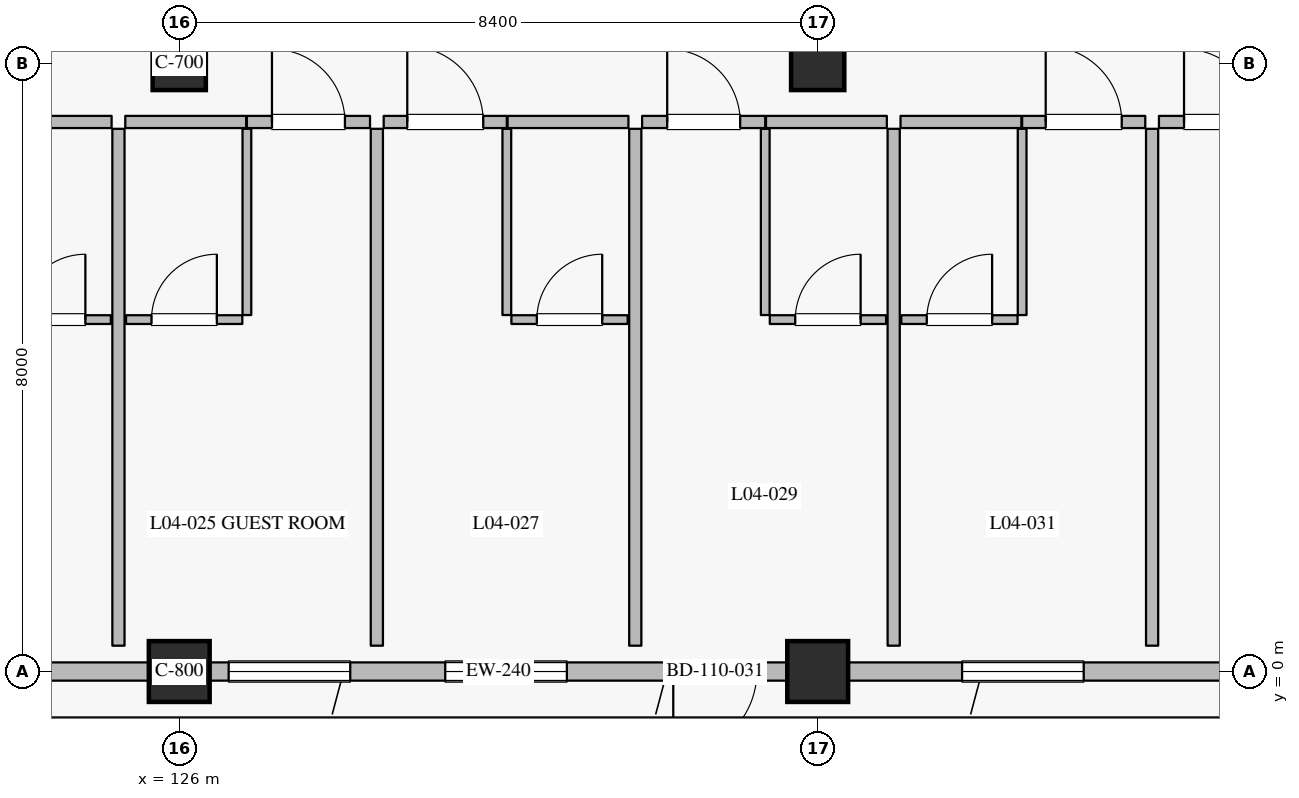
"""IFC4 building model, lengths in metres.
Left out: names, types, materials, properties, quantities, classifications, styles, units other than length and angle.
Written with IfcOpenShell. Run it as: python <this file> out.ifc"""

import sys

from ifc_helpers import new_model, si_unit, direction, frame, frame_2d, origin, origin_2d, place, context, subcontext, project, spatial, rectangle, extrude, element, fill, save


model = new_model("IFC4")
c1 = context("Model", 3, precision=1e-05, world=origin(), true_north=direction((0.0, 1.0)))
c2 = subcontext(c1, "Body", "Model", "MODEL_VIEW")
j1 = project(units=[si_unit("LENGTHUNIT", "METRE"), si_unit("PLANEANGLEUNIT", "RADIAN")], contexts=[c1])
p1 = place(None, origin())
s1 = spatial("IfcSite", under=j1, at=p1, CompositionType="ELEMENT")
p2 = place(p1, origin())
s2 = spatial("IfcBuilding", under=s1, at=p2, CompositionType="ELEMENT")
p3 = place(p2, frame((0.0, 0.0, 21.0)))
s3 = spatial("IfcBuildingStorey", under=s2, at=p3, CompositionType="ELEMENT", Elevation=21.0)
for number, where, z_axis, x_axis in (
    (1, (126.0, 0.0, 0.0), (0.0, 0.0, 1.0), (1.0, 0.0, 0.0)),
    (2, (134.4, 0.0, 0.0), (0.0, 0.0, 1.0), (1.0, 0.0, 0.0)),
):
    element("IfcColumn", number, at=place(p3, frame(where, z_axis=z_axis, x_axis=x_axis)), inside=s3, PredefinedType="COLUMN", context=c2, shape_type="SweptSolid", body=[
        extrude(rectangle(XDim=0.8, YDim=0.8, at=origin_2d()), origin(), (0.0, 0.0, 1.0), 4.2),
    ])
for number, where, z_axis, x_axis in (
    (3, (126.0, 8.0, 0.0), (0.0, 0.0, 1.0), (1.0, 0.0, 0.0)),
    (4, (134.4, 8.0, 0.0), (0.0, 0.0, 1.0), (1.0, 0.0, 0.0)),
):
    element("IfcColumn", number, at=place(p3, frame(where, z_axis=z_axis, x_axis=x_axis)), inside=s3, PredefinedType="COLUMN", context=c2, shape_type="SweptSolid", body=[
        extrude(rectangle(XDim=0.7, YDim=0.7, at=origin_2d()), origin(), (0.0, 0.0, 1.0), 4.2),
    ])
p4 = place(p3, frame((125.6, 0.0, 0.0), z_axis=(0.0, 0.0, 1.0), x_axis=(-1.0, 0.0, 0.0)))
e5 = element("IfcWall", 5, at=p4, inside=s3, PredefinedType="SOLIDWALL", context=c2, shape_type="SweptSolid", body=[
    extrude(rectangle(XDim=7.6, YDim=0.24, at=frame_2d((3.8, 0.0))), origin(), (0.0, 0.0, 1.0), 3.53),
])
p5 = place(p4, frame((1.35, 0.0, 0.0)))
e6 = element("IfcOpeningElement", 6, at=p5, cuts=e5, PredefinedType="OPENING", context=c2, shape_type="SweptSolid", body=[
    extrude(rectangle(XDim=1.5, YDim=2.25, at=frame_2d((0.75, 1.125))), frame((0.0, 0.13, 0.0), z_axis=(0.0, -1.0, 0.0), x_axis=(1.0, 0.0, 0.0)), (0.0, 0.0, 1.0), 0.26),
])
p6 = place(p4, frame((4.7, 0.0, 0.8)))
e7 = element("IfcOpeningElement", 7, at=p6, cuts=e5, PredefinedType="OPENING", context=c2, shape_type="SweptSolid", body=[
    extrude(rectangle(XDim=1.6, YDim=1.6, at=frame_2d((0.8, 0.8))), frame((0.0, 0.13, 0.0), z_axis=(0.0, -1.0, 0.0), x_axis=(1.0, 0.0, 0.0)), (0.0, 0.0, 1.0), 0.26),
])
p7 = place(p3, frame((134.0, 0.0, 0.0), z_axis=(0.0, 0.0, 1.0), x_axis=(-1.0, 0.0, 0.0)))
e8 = element("IfcWall", 8, at=p7, inside=s3, PredefinedType="SOLIDWALL", context=c2, shape_type="SweptSolid", body=[
    extrude(rectangle(XDim=7.6, YDim=0.24, at=frame_2d((3.8, 0.0))), origin(), (0.0, 0.0, 1.0), 3.53),
])
p8 = place(p7, frame((0.4, 0.0, 0.0)))
e9 = element("IfcOpeningElement", 9, at=p8, cuts=e8, PredefinedType="OPENING", context=c2, shape_type="SweptSolid", body=[
    extrude(rectangle(XDim=1.1, YDim=2.2, at=frame_2d((0.55, 1.1))), frame((0.0, 0.13, 0.0), z_axis=(0.0, -1.0, 0.0), x_axis=(1.0, 0.0, 0.0)), (0.0, 0.0, 1.0), 0.26),
])
p9 = place(p7, frame((2.9, 0.0, 0.8)))
e10 = element("IfcOpeningElement", 10, at=p9, cuts=e8, PredefinedType="OPENING", context=c2, shape_type="SweptSolid", body=[
    extrude(rectangle(XDim=1.6, YDim=1.6, at=frame_2d((0.8, 0.8))), frame((0.0, 0.13, 0.0), z_axis=(0.0, -1.0, 0.0), x_axis=(1.0, 0.0, 0.0)), (0.0, 0.0, 1.0), 0.26),
])
p10 = place(p7, frame((5.75, 0.0, 0.8)))
e11 = element("IfcOpeningElement", 11, at=p10, cuts=e8, PredefinedType="OPENING", context=c2, shape_type="SweptSolid", body=[
    extrude(rectangle(XDim=1.6, YDim=1.6, at=frame_2d((0.8, 0.8))), frame((0.0, 0.13, 0.0), z_axis=(0.0, -1.0, 0.0), x_axis=(1.0, 0.0, 0.0)), (0.0, 0.0, 1.0), 0.26),
])
p11 = place(p3, frame((142.4, 0.0, 0.0), z_axis=(0.0, 0.0, 1.0), x_axis=(-1.0, 0.0, 0.0)))
e12 = element("IfcWall", 12, at=p11, inside=s3, PredefinedType="SOLIDWALL", context=c2, shape_type="SweptSolid", body=[
    extrude(rectangle(XDim=7.6, YDim=0.24, at=frame_2d((3.8, 0.0))), origin(), (0.0, 0.0, 1.0), 3.53),
])
p12 = place(p11, frame((1.15, 0.0, 0.0)))
e13 = element("IfcOpeningElement", 13, at=p12, cuts=e12, PredefinedType="OPENING", context=c2, shape_type="SweptSolid", body=[
    extrude(rectangle(XDim=1.5, YDim=2.25, at=frame_2d((0.75, 1.125))), frame((0.0, 0.13, 0.0), z_axis=(0.0, -1.0, 0.0), x_axis=(1.0, 0.0, 0.0)), (0.0, 0.0, 1.0), 0.26),
])
p13 = place(p11, frame((4.5, 0.0, 0.8)))
e14 = element("IfcOpeningElement", 14, at=p13, cuts=e12, PredefinedType="OPENING", context=c2, shape_type="SweptSolid", body=[
    extrude(rectangle(XDim=1.6, YDim=1.6, at=frame_2d((0.8, 0.8))), frame((0.0, 0.13, 0.0), z_axis=(0.0, -1.0, 0.0), x_axis=(1.0, 0.0, 0.0)), (0.0, 0.0, 1.0), 0.26),
])
p14 = place(p3, frame((123.52, 7.23, 0.0), z_axis=(0.0, 0.0, 1.0), x_axis=(1.0, 0.0, 0.0)))
e15 = element("IfcWall", 15, at=p14, inside=s3, PredefinedType="PARTITIONING", context=c2, shape_type="SweptSolid", body=[
    extrude(rectangle(XDim=1.59, YDim=0.16, at=frame_2d((0.795, 0.0))), origin(), (0.0, 0.0, 1.0), 3.965),
])
p15 = place(p3, frame((123.57, 4.63, 0.0), z_axis=(0.0, 0.0, 1.0), x_axis=(1.0, 0.0, 0.0)))
e16 = element("IfcWall", 16, at=p15, inside=s3, PredefinedType="PARTITIONING", context=c2, shape_type="SweptSolid", body=[
    extrude(rectangle(XDim=1.53, YDim=0.115, at=frame_2d((0.765, 0.0))), origin(), (0.0, 0.0, 1.0), 3.965),
])
p16 = place(p15, frame((0.335, 0.0, 0.0)))
e17 = element("IfcOpeningElement", 17, at=p16, cuts=e16, PredefinedType="OPENING", context=c2, shape_type="SweptSolid", body=[
    extrude(rectangle(XDim=0.86, YDim=2.12, at=frame_2d((0.43, 1.06))), frame((0.0, 0.067, 0.0), z_axis=(0.0, -1.0, 0.0), x_axis=(1.0, 0.0, 0.0)), (0.0, 0.0, 1.0), 0.135),
])
p17 = place(p3, frame((125.29, 7.23, 0.0), z_axis=(0.0, 0.0, 1.0), x_axis=(1.0, 0.0, 0.0)))
e18 = element("IfcWall", 18, at=p17, inside=s3, PredefinedType="PARTITIONING", context=c2, shape_type="SweptSolid", body=[
    extrude(rectangle(XDim=1.59, YDim=0.16, at=frame_2d((0.795, 0.0))), origin(), (0.0, 0.0, 1.0), 3.965),
])
p18 = place(p3, frame((126.89, 7.23, 0.0), z_axis=(0.0, 0.0, 1.0), x_axis=(1.0, 0.0, 0.0)))
e19 = element("IfcWall", 19, at=p18, inside=s3, PredefinedType="PARTITIONING", context=c2, shape_type="SweptSolid", body=[
    extrude(rectangle(XDim=1.62, YDim=0.16, at=frame_2d((0.81, 0.0))), origin(), (0.0, 0.0, 1.0), 3.965),
])
p19 = place(p18, frame((0.33, 0.0, 0.0)))
e20 = element("IfcOpeningElement", 20, at=p19, cuts=e19, PredefinedType="OPENING", context=c2, shape_type="SweptSolid", body=[
    extrude(rectangle(XDim=0.96, YDim=2.2, at=frame_2d((0.48, 1.1))), frame((0.0, 0.09, 0.0), z_axis=(0.0, -1.0, 0.0), x_axis=(1.0, 0.0, 0.0)), (0.0, 0.0, 1.0), 0.18),
])
p20 = place(p3, frame((126.89, 4.69, 0.0), z_axis=(0.0, 0.0, 1.0), x_axis=(0.0, 1.0, 0.0)))
e21 = element("IfcWall", 21, at=p20, inside=s3, PredefinedType="PARTITIONING", context=c2, shape_type="SweptSolid", body=[
    extrude(rectangle(XDim=2.45, YDim=0.115, at=frame_2d((1.225, 0.0))), origin(), (0.0, 0.0, 1.0), 3.965),
])
p21 = place(p3, frame((125.3, 4.63, 0.0), z_axis=(0.0, 0.0, 1.0), x_axis=(1.0, 0.0, 0.0)))
e22 = element("IfcWall", 22, at=p21, inside=s3, PredefinedType="PARTITIONING", context=c2, shape_type="SweptSolid", body=[
    extrude(rectangle(XDim=1.53, YDim=0.115, at=frame_2d((0.765, 0.0))), origin(), (0.0, 0.0, 1.0), 3.965),
])
p22 = place(p21, frame((0.335, 0.0, 0.0)))
e23 = element("IfcOpeningElement", 23, at=p22, cuts=e22, PredefinedType="OPENING", context=c2, shape_type="SweptSolid", body=[
    extrude(rectangle(XDim=0.86, YDim=2.12, at=frame_2d((0.43, 1.06))), frame((0.0, 0.067, 0.0), z_axis=(0.0, -1.0, 0.0), x_axis=(1.0, 0.0, 0.0)), (0.0, 0.0, 1.0), 0.135),
])
p23 = place(p3, frame((125.2, 0.34, 0.0), z_axis=(0.0, 0.0, 1.0), x_axis=(0.0, 1.0, 0.0)))
e24 = element("IfcWall", 24, at=p23, inside=s3, PredefinedType="PARTITIONING", context=c2, shape_type="SweptSolid", body=[
    extrude(rectangle(XDim=6.8, YDim=0.16, at=frame_2d((3.4, 0.0))), origin(), (0.0, 0.0, 1.0), 3.965),
])
p24 = place(p3, frame((128.69, 7.23, 0.0), z_axis=(0.0, 0.0, 1.0), x_axis=(1.0, 0.0, 0.0)))
e25 = element("IfcWall", 25, at=p24, inside=s3, PredefinedType="PARTITIONING", context=c2, shape_type="SweptSolid", body=[
    extrude(rectangle(XDim=1.62, YDim=0.16, at=frame_2d((0.81, 0.0))), origin(), (0.0, 0.0, 1.0), 3.965),
])
p25 = place(p24, frame((0.31, 0.0, 0.0)))
e26 = element("IfcOpeningElement", 26, at=p25, cuts=e25, PredefinedType="OPENING", context=c2, shape_type="SweptSolid", body=[
    extrude(rectangle(XDim=1.0, YDim=2.25, at=frame_2d((0.5, 1.125))), frame((0.0, 0.09, 0.0), z_axis=(0.0, -1.0, 0.0), x_axis=(1.0, 0.0, 0.0)), (0.0, 0.0, 1.0), 0.18),
])
p26 = place(p3, frame((130.32, 7.23, 0.0), z_axis=(0.0, 0.0, 1.0), x_axis=(1.0, 0.0, 0.0)))
e27 = element("IfcWall", 27, at=p26, inside=s3, PredefinedType="PARTITIONING", context=c2, shape_type="SweptSolid", body=[
    extrude(rectangle(XDim=1.59, YDim=0.16, at=frame_2d((0.795, 0.0))), origin(), (0.0, 0.0, 1.0), 3.965),
])
p27 = place(p3, frame((130.31, 4.69, 0.0), z_axis=(0.0, 0.0, 1.0), x_axis=(0.0, 1.0, 0.0)))
e28 = element("IfcWall", 28, at=p27, inside=s3, PredefinedType="PARTITIONING", context=c2, shape_type="SweptSolid", body=[
    extrude(rectangle(XDim=2.45, YDim=0.115, at=frame_2d((1.225, 0.0))), origin(), (0.0, 0.0, 1.0), 3.965),
])
p28 = place(p3, frame((130.37, 4.63, 0.0), z_axis=(0.0, 0.0, 1.0), x_axis=(1.0, 0.0, 0.0)))
e29 = element("IfcWall", 29, at=p28, inside=s3, PredefinedType="PARTITIONING", context=c2, shape_type="SweptSolid", body=[
    extrude(rectangle(XDim=1.53, YDim=0.115, at=frame_2d((0.765, 0.0))), origin(), (0.0, 0.0, 1.0), 3.965),
])
p29 = place(p28, frame((0.335, 0.0, 0.0)))
e30 = element("IfcOpeningElement", 30, at=p29, cuts=e29, PredefinedType="OPENING", context=c2, shape_type="SweptSolid", body=[
    extrude(rectangle(XDim=0.86, YDim=2.12, at=frame_2d((0.43, 1.06))), frame((0.0, 0.067, 0.0), z_axis=(0.0, -1.0, 0.0), x_axis=(1.0, 0.0, 0.0)), (0.0, 0.0, 1.0), 0.135),
])
p30 = place(p3, frame((128.6, 0.34, 0.0), z_axis=(0.0, 0.0, 1.0), x_axis=(0.0, 1.0, 0.0)))
e31 = element("IfcWall", 31, at=p30, inside=s3, PredefinedType="PARTITIONING", context=c2, shape_type="SweptSolid", body=[
    extrude(rectangle(XDim=6.8, YDim=0.16, at=frame_2d((3.4, 0.0))), origin(), (0.0, 0.0, 1.0), 3.965),
])
p31 = place(p3, frame((132.09, 7.23, 0.0), z_axis=(0.0, 0.0, 1.0), x_axis=(1.0, 0.0, 0.0)))
e32 = element("IfcWall", 32, at=p31, inside=s3, PredefinedType="PARTITIONING", context=c2, shape_type="SweptSolid", body=[
    extrude(rectangle(XDim=1.62, YDim=0.16, at=frame_2d((0.81, 0.0))), origin(), (0.0, 0.0, 1.0), 3.965),
])
p32 = place(p31, frame((0.33, 0.0, 0.0)))
e33 = element("IfcOpeningElement", 33, at=p32, cuts=e32, PredefinedType="OPENING", context=c2, shape_type="SweptSolid", body=[
    extrude(rectangle(XDim=0.96, YDim=2.2, at=frame_2d((0.48, 1.1))), frame((0.0, 0.09, 0.0), z_axis=(0.0, -1.0, 0.0), x_axis=(1.0, 0.0, 0.0)), (0.0, 0.0, 1.0), 0.18),
])
p33 = place(p3, frame((133.72, 7.23, 0.0), z_axis=(0.0, 0.0, 1.0), x_axis=(1.0, 0.0, 0.0)))
e34 = element("IfcWall", 34, at=p33, inside=s3, PredefinedType="PARTITIONING", context=c2, shape_type="SweptSolid", body=[
    extrude(rectangle(XDim=1.59, YDim=0.16, at=frame_2d((0.795, 0.0))), origin(), (0.0, 0.0, 1.0), 3.965),
])
p34 = place(p3, frame((133.71, 4.69, 0.0), z_axis=(0.0, 0.0, 1.0), x_axis=(0.0, 1.0, 0.0)))
e35 = element("IfcWall", 35, at=p34, inside=s3, PredefinedType="PARTITIONING", context=c2, shape_type="SweptSolid", body=[
    extrude(rectangle(XDim=2.45, YDim=0.115, at=frame_2d((1.225, 0.0))), origin(), (0.0, 0.0, 1.0), 3.965),
])
p35 = place(p3, frame((133.77, 4.63, 0.0), z_axis=(0.0, 0.0, 1.0), x_axis=(1.0, 0.0, 0.0)))
e36 = element("IfcWall", 36, at=p35, inside=s3, PredefinedType="PARTITIONING", context=c2, shape_type="SweptSolid", body=[
    extrude(rectangle(XDim=1.53, YDim=0.115, at=frame_2d((0.765, 0.0))), origin(), (0.0, 0.0, 1.0), 3.965),
])
p36 = place(p35, frame((0.335, 0.0, 0.0)))
e37 = element("IfcOpeningElement", 37, at=p36, cuts=e36, PredefinedType="OPENING", context=c2, shape_type="SweptSolid", body=[
    extrude(rectangle(XDim=0.86, YDim=2.12, at=frame_2d((0.43, 1.06))), frame((0.0, 0.067, 0.0), z_axis=(0.0, -1.0, 0.0), x_axis=(1.0, 0.0, 0.0)), (0.0, 0.0, 1.0), 0.135),
])
p37 = place(p3, frame((132.0, 0.34, 0.0), z_axis=(0.0, 0.0, 1.0), x_axis=(0.0, 1.0, 0.0)))
e38 = element("IfcWall", 38, at=p37, inside=s3, PredefinedType="PARTITIONING", context=c2, shape_type="SweptSolid", body=[
    extrude(rectangle(XDim=6.8, YDim=0.16, at=frame_2d((3.4, 0.0))), origin(), (0.0, 0.0, 1.0), 3.965),
])
p38 = place(p3, frame((135.49, 7.23, 0.0), z_axis=(0.0, 0.0, 1.0), x_axis=(1.0, 0.0, 0.0)))
e39 = element("IfcWall", 39, at=p38, inside=s3, PredefinedType="PARTITIONING", context=c2, shape_type="SweptSolid", body=[
    extrude(rectangle(XDim=1.59, YDim=0.16, at=frame_2d((0.795, 0.0))), origin(), (0.0, 0.0, 1.0), 3.965),
])
p39 = place(p3, frame((137.09, 7.23, 0.0), z_axis=(0.0, 0.0, 1.0), x_axis=(1.0, 0.0, 0.0)))
e40 = element("IfcWall", 40, at=p39, inside=s3, PredefinedType="PARTITIONING", context=c2, shape_type="SweptSolid", body=[
    extrude(rectangle(XDim=1.62, YDim=0.16, at=frame_2d((0.81, 0.0))), origin(), (0.0, 0.0, 1.0), 3.965),
])
p40 = place(p39, frame((0.31, 0.0, 0.0)))
e41 = element("IfcOpeningElement", 41, at=p40, cuts=e40, PredefinedType="OPENING", context=c2, shape_type="SweptSolid", body=[
    extrude(rectangle(XDim=1.0, YDim=2.25, at=frame_2d((0.5, 1.125))), frame((0.0, 0.09, 0.0), z_axis=(0.0, -1.0, 0.0), x_axis=(1.0, 0.0, 0.0)), (0.0, 0.0, 1.0), 0.18),
])
p41 = place(p3, frame((137.09, 4.69, 0.0), z_axis=(0.0, 0.0, 1.0), x_axis=(0.0, 1.0, 0.0)))
e42 = element("IfcWall", 42, at=p41, inside=s3, PredefinedType="PARTITIONING", context=c2, shape_type="SweptSolid", body=[
    extrude(rectangle(XDim=2.45, YDim=0.115, at=frame_2d((1.225, 0.0))), origin(), (0.0, 0.0, 1.0), 3.965),
])
p42 = place(p3, frame((135.5, 4.63, 0.0), z_axis=(0.0, 0.0, 1.0), x_axis=(1.0, 0.0, 0.0)))
e43 = element("IfcWall", 43, at=p42, inside=s3, PredefinedType="PARTITIONING", context=c2, shape_type="SweptSolid", body=[
    extrude(rectangle(XDim=1.53, YDim=0.115, at=frame_2d((0.765, 0.0))), origin(), (0.0, 0.0, 1.0), 3.965),
])
p43 = place(p42, frame((0.335, 0.0, 0.0)))
e44 = element("IfcOpeningElement", 44, at=p43, cuts=e43, PredefinedType="OPENING", context=c2, shape_type="SweptSolid", body=[
    extrude(rectangle(XDim=0.86, YDim=2.12, at=frame_2d((0.43, 1.06))), frame((0.0, 0.067, 0.0), z_axis=(0.0, -1.0, 0.0), x_axis=(1.0, 0.0, 0.0)), (0.0, 0.0, 1.0), 0.135),
])
p44 = place(p3, frame((135.4, 0.34, 0.0), z_axis=(0.0, 0.0, 1.0), x_axis=(0.0, 1.0, 0.0)))
e45 = element("IfcWall", 45, at=p44, inside=s3, PredefinedType="PARTITIONING", context=c2, shape_type="SweptSolid", body=[
    extrude(rectangle(XDim=6.8, YDim=0.16, at=frame_2d((3.4, 0.0))), origin(), (0.0, 0.0, 1.0), 3.965),
])
p45 = place(p3, frame((138.89, 7.23, 0.0), z_axis=(0.0, 0.0, 1.0), x_axis=(1.0, 0.0, 0.0)))
e46 = element("IfcWall", 46, at=p45, inside=s3, PredefinedType="PARTITIONING", context=c2, shape_type="SweptSolid", body=[
    extrude(rectangle(XDim=1.62, YDim=0.16, at=frame_2d((0.81, 0.0))), origin(), (0.0, 0.0, 1.0), 3.965),
])
p46 = place(p45, frame((0.33, 0.0, 0.0)))
e47 = element("IfcOpeningElement", 47, at=p46, cuts=e46, PredefinedType="OPENING", context=c2, shape_type="SweptSolid", body=[
    extrude(rectangle(XDim=0.96, YDim=2.2, at=frame_2d((0.48, 1.1))), frame((0.0, 0.09, 0.0), z_axis=(0.0, -1.0, 0.0), x_axis=(1.0, 0.0, 0.0)), (0.0, 0.0, 1.0), 0.18),
])
p47 = place(p3, frame((138.8, 0.34, 0.0), z_axis=(0.0, 0.0, 1.0), x_axis=(0.0, 1.0, 0.0)))
e48 = element("IfcWall", 48, at=p47, inside=s3, PredefinedType="PARTITIONING", context=c2, shape_type="SweptSolid", body=[
    extrude(rectangle(XDim=6.8, YDim=0.16, at=frame_2d((3.4, 0.0))), origin(), (0.0, 0.0, 1.0), 3.965),
])
p48 = place(p8, origin())
e49 = element("IfcDoor", 49, at=p48, inside=s3, OperationType="SINGLE_SWING_RIGHT", PredefinedType="DOOR", context=c2, shape_type="SweptSolid", body=[
    extrude(rectangle(XDim=1.1, YDim=2.2, at=frame_2d((0.55, 1.1))), frame((0.0, 0.025, 0.0), z_axis=(0.0, -1.0, 0.0), x_axis=(1.0, 0.0, 0.0)), (0.0, 0.0, 1.0), 0.05),
])
fill(e9, e49)
p49 = place(p9, origin())
e50 = element("IfcWindow", 50, at=p49, inside=s3, PartitioningType="SINGLE_PANEL", PredefinedType="WINDOW", context=c2, shape_type="SweptSolid", body=[
    extrude(rectangle(XDim=1.6, YDim=1.6, at=frame_2d((0.8, 0.8))), frame((0.0, 0.03, 0.0), z_axis=(0.0, -1.0, 0.0), x_axis=(1.0, 0.0, 0.0)), (0.0, 0.0, 1.0), 0.06),
])
fill(e10, e50)
p50 = place(p10, origin())
e51 = element("IfcWindow", 51, at=p50, inside=s3, PartitioningType="SINGLE_PANEL", PredefinedType="WINDOW", context=c2, shape_type="SweptSolid", body=[
    extrude(rectangle(XDim=1.6, YDim=1.6, at=frame_2d((0.8, 0.8))), frame((0.0, 0.03, 0.0), z_axis=(0.0, -1.0, 0.0), x_axis=(1.0, 0.0, 0.0)), (0.0, 0.0, 1.0), 0.06),
])
fill(e11, e51)
p51 = place(p13, origin())
e52 = element("IfcWindow", 52, at=p51, inside=s3, PartitioningType="SINGLE_PANEL", PredefinedType="WINDOW", context=c2, shape_type="SweptSolid", body=[
    extrude(rectangle(XDim=1.6, YDim=1.6, at=frame_2d((0.8, 0.8))), frame((0.0, 0.03, 0.0), z_axis=(0.0, -1.0, 0.0), x_axis=(1.0, 0.0, 0.0)), (0.0, 0.0, 1.0), 0.06),
])
fill(e14, e52)
p52 = place(p16, origin())
e53 = element("IfcDoor", 53, at=p52, inside=s3, OperationType="SINGLE_SWING_RIGHT", PredefinedType="DOOR", context=c2, shape_type="SweptSolid", body=[
    extrude(rectangle(XDim=0.86, YDim=2.12, at=frame_2d((0.43, 1.06))), frame((0.0, 0.025, 0.0), z_axis=(0.0, -1.0, 0.0), x_axis=(1.0, 0.0, 0.0)), (0.0, 0.0, 1.0), 0.05),
])
fill(e17, e53)
p53 = place(p19, origin())
e54 = element("IfcDoor", 54, at=p53, inside=s3, OperationType="SINGLE_SWING_LEFT", PredefinedType="DOOR", context=c2, shape_type="SweptSolid", body=[
    extrude(rectangle(XDim=0.96, YDim=2.2, at=frame_2d((0.48, 1.1))), frame((0.0, 0.025, 0.0), z_axis=(0.0, -1.0, 0.0), x_axis=(1.0, 0.0, 0.0)), (0.0, 0.0, 1.0), 0.05),
])
fill(e20, e54)
p54 = place(p22, origin())
e55 = element("IfcDoor", 55, at=p54, inside=s3, OperationType="SINGLE_SWING_RIGHT", PredefinedType="DOOR", context=c2, shape_type="SweptSolid", body=[
    extrude(rectangle(XDim=0.86, YDim=2.12, at=frame_2d((0.43, 1.06))), frame((0.0, 0.025, 0.0), z_axis=(0.0, -1.0, 0.0), x_axis=(1.0, 0.0, 0.0)), (0.0, 0.0, 1.0), 0.05),
])
fill(e23, e55)
p55 = place(p25, origin())
e56 = element("IfcDoor", 56, at=p55, inside=s3, OperationType="SINGLE_SWING_LEFT", PredefinedType="DOOR", context=c2, shape_type="SweptSolid", body=[
    extrude(rectangle(XDim=1.0, YDim=2.25, at=frame_2d((0.5, 1.125))), frame((0.0, 0.025, 0.0), z_axis=(0.0, -1.0, 0.0), x_axis=(1.0, 0.0, 0.0)), (0.0, 0.0, 1.0), 0.05),
])
fill(e26, e56)
p56 = place(p29, origin())
e57 = element("IfcDoor", 57, at=p56, inside=s3, OperationType="SINGLE_SWING_RIGHT", PredefinedType="DOOR", context=c2, shape_type="SweptSolid", body=[
    extrude(rectangle(XDim=0.86, YDim=2.12, at=frame_2d((0.43, 1.06))), frame((0.0, 0.025, 0.0), z_axis=(0.0, -1.0, 0.0), x_axis=(1.0, 0.0, 0.0)), (0.0, 0.0, 1.0), 0.05),
])
fill(e30, e57)
p57 = place(p32, origin())
e58 = element("IfcDoor", 58, at=p57, inside=s3, OperationType="SINGLE_SWING_LEFT", PredefinedType="DOOR", context=c2, shape_type="SweptSolid", body=[
    extrude(rectangle(XDim=0.96, YDim=2.2, at=frame_2d((0.48, 1.1))), frame((0.0, 0.025, 0.0), z_axis=(0.0, -1.0, 0.0), x_axis=(1.0, 0.0, 0.0)), (0.0, 0.0, 1.0), 0.05),
])
fill(e33, e58)
p58 = place(p36, origin())
e59 = element("IfcDoor", 59, at=p58, inside=s3, OperationType="SINGLE_SWING_RIGHT", PredefinedType="DOOR", context=c2, shape_type="SweptSolid", body=[
    extrude(rectangle(XDim=0.86, YDim=2.12, at=frame_2d((0.43, 1.06))), frame((0.0, 0.025, 0.0), z_axis=(0.0, -1.0, 0.0), x_axis=(1.0, 0.0, 0.0)), (0.0, 0.0, 1.0), 0.05),
])
fill(e37, e59)
p59 = place(p40, origin())
e60 = element("IfcDoor", 60, at=p59, inside=s3, OperationType="SINGLE_SWING_LEFT", PredefinedType="DOOR", context=c2, shape_type="SweptSolid", body=[
    extrude(rectangle(XDim=1.0, YDim=2.25, at=frame_2d((0.5, 1.125))), frame((0.0, 0.025, 0.0), z_axis=(0.0, -1.0, 0.0), x_axis=(1.0, 0.0, 0.0)), (0.0, 0.0, 1.0), 0.05),
])
fill(e41, e60)
p60 = place(p43, origin())
e61 = element("IfcDoor", 61, at=p60, inside=s3, OperationType="SINGLE_SWING_RIGHT", PredefinedType="DOOR", context=c2, shape_type="SweptSolid", body=[
    extrude(rectangle(XDim=0.86, YDim=2.12, at=frame_2d((0.43, 1.06))), frame((0.0, 0.025, 0.0), z_axis=(0.0, -1.0, 0.0), x_axis=(1.0, 0.0, 0.0)), (0.0, 0.0, 1.0), 0.05),
])
fill(e44, e61)
p61 = place(p46, origin())
e62 = element("IfcDoor", 62, at=p61, inside=s3, OperationType="SINGLE_SWING_LEFT", PredefinedType="DOOR", context=c2, shape_type="SweptSolid", body=[
    extrude(rectangle(XDim=0.96, YDim=2.2, at=frame_2d((0.48, 1.1))), frame((0.0, 0.025, 0.0), z_axis=(0.0, -1.0, 0.0), x_axis=(1.0, 0.0, 0.0)), (0.0, 0.0, 1.0), 0.05),
])
fill(e47, e62)
save(model, sys.argv[1])
